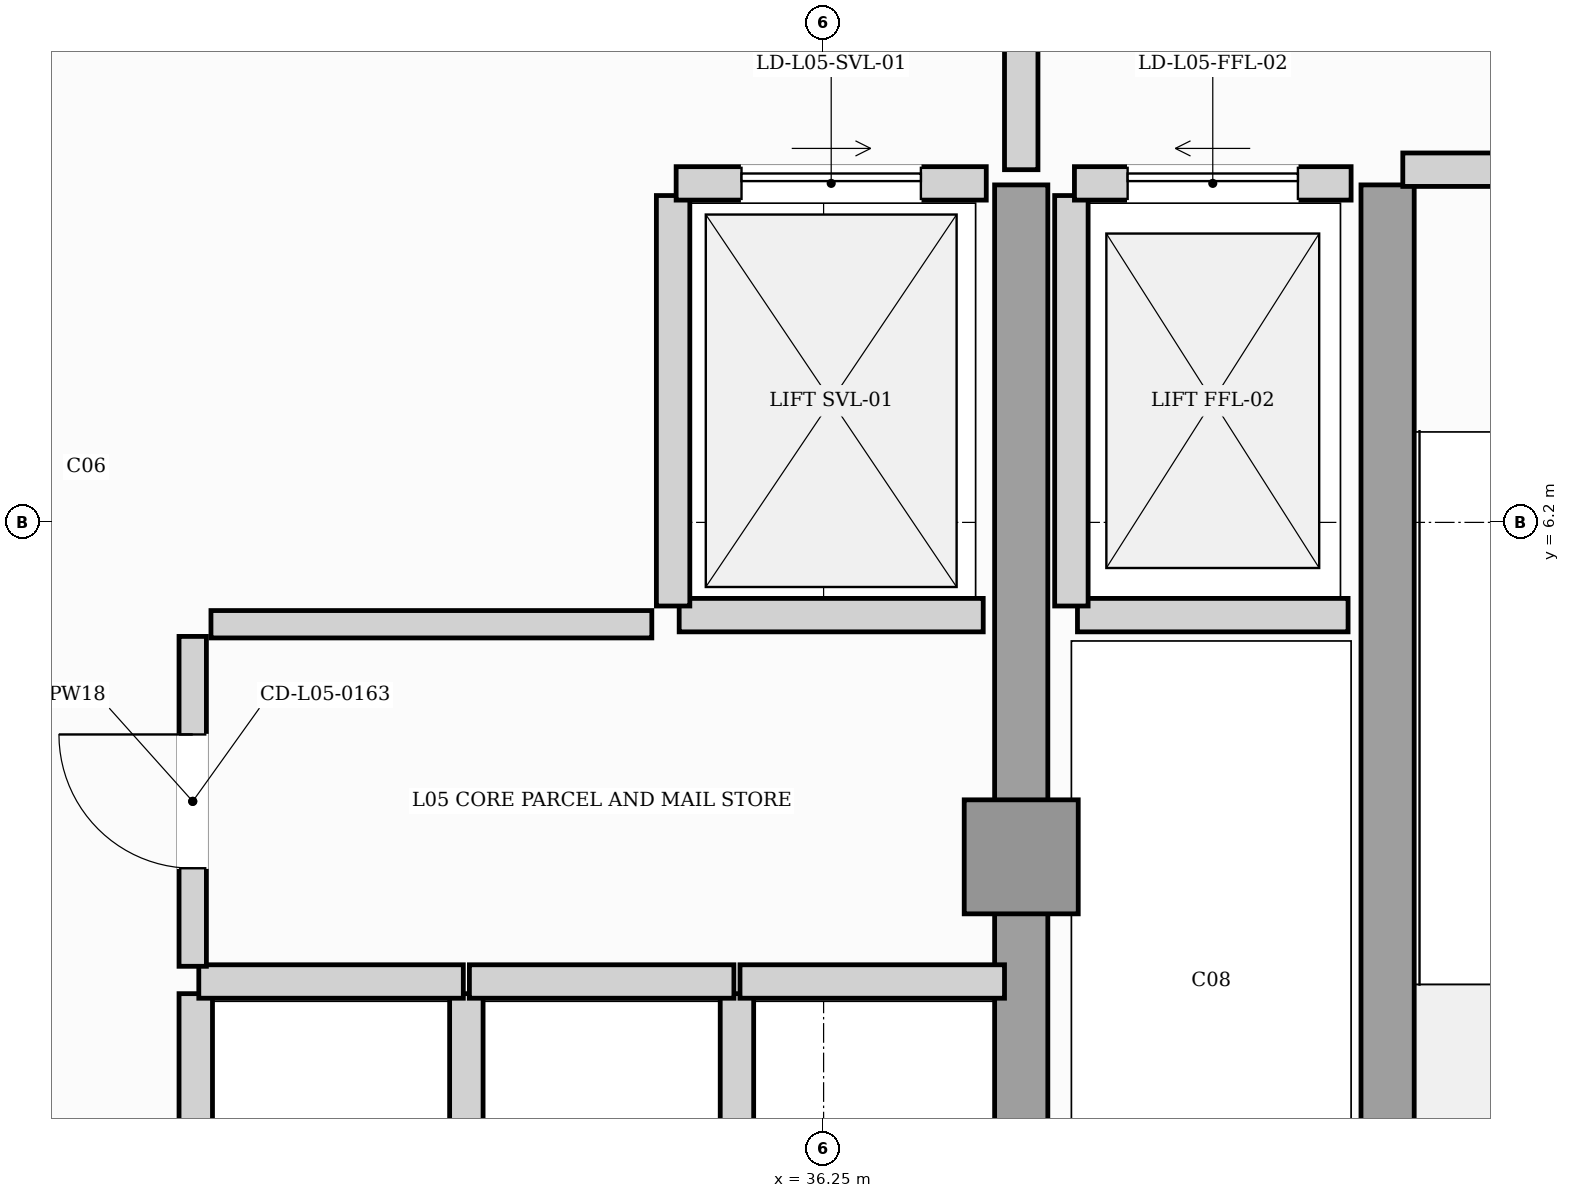
"""IFC4 building model, lengths in metres.
Left out: names, types, materials, properties, quantities, classifications, styles, units other than length and angle.
Written with IfcOpenShell. Run it as: python <this file> out.ifc"""

import sys

from ifc_helpers import new_model, si_unit, direction, frame, frame_2d, origin, origin_2d, place, context, subcontext, project, spatial, rectangle, extrude, element, fill, save


model = new_model("IFC4")
c1 = context("Model", 3, precision=1e-05, world=origin(), true_north=direction((0.0, 1.0)))
c2 = subcontext(c1, "Body", "Model", "MODEL_VIEW")
j1 = project(units=[si_unit("LENGTHUNIT", "METRE"), si_unit("PLANEANGLEUNIT", "RADIAN")], contexts=[c1])
p1 = place(None, origin())
s1 = spatial("IfcSite", under=j1, at=p1, CompositionType="ELEMENT")
p2 = place(p1, origin())
s2 = spatial("IfcBuilding", under=s1, at=p2, CompositionType="ELEMENT")
p3 = place(p2, frame((0.0, 0.0, 24.6)))
s3 = spatial("IfcBuildingStorey", under=s2, at=p3, CompositionType="ELEMENT", Elevation=24.6)
for number, where, z_axis, x_axis in (
    (1, (37.55, 0.92, 0.0), (0.0, 0.0, 1.0), (0.0, 1.0, 0.0)),
    (2, (39.96, 0.92, 0.0), (0.0, 0.0, 1.0), (0.0, 1.0, 0.0)),
):
    element("IfcWall", number, at=place(p3, frame(where, z_axis=z_axis, x_axis=x_axis)), inside=s3, PredefinedType="SHEAR", context=c2, shape_type="SweptSolid", body=[
        extrude(rectangle(XDim=7.5, YDim=0.35, at=frame_2d((3.75, 0.0))), origin(), (0.0, 0.0, 1.0), 4.95),
    ])
p4 = place(p3, frame((37.55, 4.0, 0.0), z_axis=(0.0, 0.0, 1.0), x_axis=(1.0, 0.0, 0.0)))
e3 = element("IfcColumn", 3, at=p4, inside=s3, PredefinedType="COLUMN", context=c2, shape_type="SweptSolid", body=[
    extrude(rectangle(XDim=0.75, YDim=0.75, at=origin_2d()), origin(), (0.0, 0.0, 1.0), 5.2),
])
p5 = place(p3, frame((37.92, 5.59, 0.0), z_axis=(0.0, 0.0, 1.0), x_axis=(1.0, 0.0, 0.0)))
e4 = element("IfcWall", 4, at=p5, inside=s3, PredefinedType="SOLIDWALL", context=c2, shape_type="SweptSolid", body=[
    extrude(rectangle(XDim=1.78, YDim=0.22, at=frame_2d((0.89, 0.0))), origin(), (0.0, 0.0, 1.0), 4.95),
])
p6 = place(p3, frame((37.88, 5.65, 0.0), z_axis=(0.0, 0.0, 1.0), x_axis=(0.0, 1.0, 0.0)))
e5 = element("IfcWall", 5, at=p6, inside=s3, PredefinedType="SOLIDWALL", context=c2, shape_type="SweptSolid", body=[
    extrude(rectangle(XDim=2.7, YDim=0.22, at=frame_2d((1.35, 0.0))), origin(), (0.0, 0.0, 1.0), 4.95),
])
p7 = place(p3, frame((37.9, 8.43, 0.0), z_axis=(0.0, 0.0, 1.0), x_axis=(1.0, 0.0, 0.0)))
e6 = element("IfcWall", 6, at=p7, inside=s3, PredefinedType="SOLIDWALL", context=c2, shape_type="SweptSolid", body=[
    extrude(rectangle(XDim=1.82, YDim=0.22, at=frame_2d((0.91, 0.0))), origin(), (0.0, 0.0, 1.0), 4.95),
])
p8 = place(p7, frame((0.35, 0.0, 0.0)))
e7 = element("IfcOpeningElement", 7, at=p8, cuts=e6, PredefinedType="OPENING", context=c2, shape_type="SweptSolid", body=[
    extrude(rectangle(XDim=1.12, YDim=2.25, at=frame_2d((0.56, 1.125))), frame((0.0, 0.12, 0.0), z_axis=(0.0, -1.0, 0.0), x_axis=(1.0, 0.0, 0.0)), (0.0, 0.0, 1.0), 0.24),
])
p9 = place(p3, frame((35.3, 5.59, 0.0), z_axis=(0.0, 0.0, 1.0), x_axis=(1.0, 0.0, 0.0)))
e8 = element("IfcWall", 8, at=p9, inside=s3, PredefinedType="SOLIDWALL", context=c2, shape_type="SweptSolid", body=[
    extrude(rectangle(XDim=2.0, YDim=0.22, at=frame_2d((1.0, 0.0))), origin(), (0.0, 0.0, 1.0), 4.95),
])
p10 = place(p3, frame((35.26, 5.65, 0.0), z_axis=(0.0, 0.0, 1.0), x_axis=(0.0, 1.0, 0.0)))
e9 = element("IfcWall", 9, at=p10, inside=s3, PredefinedType="SOLIDWALL", context=c2, shape_type="SweptSolid", body=[
    extrude(rectangle(XDim=2.7, YDim=0.22, at=frame_2d((1.35, 0.0))), origin(), (0.0, 0.0, 1.0), 4.95),
])
p11 = place(p3, frame((35.28, 8.43, 0.0), z_axis=(0.0, 0.0, 1.0), x_axis=(1.0, 0.0, 0.0)))
e10 = element("IfcWall", 10, at=p11, inside=s3, PredefinedType="SOLIDWALL", context=c2, shape_type="SweptSolid", body=[
    extrude(rectangle(XDim=2.04, YDim=0.22, at=frame_2d((1.02, 0.0))), origin(), (0.0, 0.0, 1.0), 4.95),
])
p12 = place(p11, frame((0.43, 0.0, 0.0)))
e11 = element("IfcOpeningElement", 11, at=p12, cuts=e10, PredefinedType="OPENING", context=c2, shape_type="SweptSolid", body=[
    extrude(rectangle(XDim=1.18, YDim=2.2, at=frame_2d((0.59, 1.1))), frame((0.0, 0.12, 0.0), z_axis=(0.0, -1.0, 0.0), x_axis=(1.0, 0.0, 0.0)), (0.0, 0.0, 1.0), 0.24),
])
for number, where, z_axis, x_axis in (
    (12, (32.12, 0.9, 0.0), (0.0, 0.0, 1.0), (0.0, 1.0, 0.0)),
    (13, (33.9, 0.9, 0.0), (0.0, 0.0, 1.0), (0.0, 1.0, 0.0)),
):
    element("IfcWall", number, at=place(p3, frame(where, z_axis=z_axis, x_axis=x_axis)), inside=s3, PredefinedType="SOLIDWALL", context=c2, shape_type="SweptSolid", body=[
        extrude(rectangle(XDim=2.2, YDim=0.22, at=frame_2d((1.1, 0.0))), origin(), (0.0, 0.0, 1.0), 4.95),
    ])
p13 = place(p3, frame((32.14, 3.18, 0.0), z_axis=(0.0, 0.0, 1.0), x_axis=(1.0, 0.0, 0.0)))
e14 = element("IfcWall", 14, at=p13, inside=s3, PredefinedType="SOLIDWALL", context=c2, shape_type="SweptSolid", body=[
    extrude(rectangle(XDim=1.74, YDim=0.22, at=frame_2d((0.87, 0.0))), origin(), (0.0, 0.0, 1.0), 4.95),
])
p14 = place(p3, frame((35.68, 0.9, 0.0), z_axis=(0.0, 0.0, 1.0), x_axis=(0.0, 1.0, 0.0)))
e15 = element("IfcWall", 15, at=p14, inside=s3, PredefinedType="SOLIDWALL", context=c2, shape_type="SweptSolid", body=[
    extrude(rectangle(XDim=2.2, YDim=0.22, at=frame_2d((1.1, 0.0))), origin(), (0.0, 0.0, 1.0), 4.95),
])
for number, where, z_axis, x_axis in (
    (16, (33.92, 3.18, 0.0), (0.0, 0.0, 1.0), (1.0, 0.0, 0.0)),
    (17, (35.7, 3.18, 0.0), (0.0, 0.0, 1.0), (1.0, 0.0, 0.0)),
):
    element("IfcWall", number, at=place(p3, frame(where, z_axis=z_axis, x_axis=x_axis)), inside=s3, PredefinedType="SOLIDWALL", context=c2, shape_type="SweptSolid", body=[
        extrude(rectangle(XDim=1.74, YDim=0.22, at=frame_2d((0.87, 0.0))), origin(), (0.0, 0.0, 1.0), 4.95),
    ])
p15 = place(p3, frame((40.06, 8.52, 0.0), z_axis=(0.0, 0.0, 1.0), x_axis=(1.0, 0.0, 0.0)))
e18 = element("IfcWall", 18, at=p15, inside=s3, PredefinedType="SOLIDWALL", context=c2, shape_type="SweptSolid", body=[
    extrude(rectangle(XDim=3.4, YDim=0.22, at=frame_2d((1.7, 0.0))), origin(), (0.0, 0.0, 1.0), 4.95),
])
p16 = place(p15, frame((1.125, 0.0, 0.0)))
e19 = element("IfcOpeningElement", 19, at=p16, cuts=e18, PredefinedType="OPENING", context=c2, shape_type="SweptSolid", body=[
    extrude(rectangle(XDim=1.15, YDim=2.2, at=frame_2d((0.575, 1.1))), frame((0.0, 0.12, 0.0), z_axis=(0.0, -1.0, 0.0), x_axis=(1.0, 0.0, 0.0)), (0.0, 0.0, 1.0), 0.24),
])
p17 = place(p3, frame((37.55, 8.52, 0.0), z_axis=(0.0, 0.0, 1.0), x_axis=(0.0, 1.0, 0.0)))
e20 = element("IfcWall", 20, at=p17, inside=s3, PredefinedType="SOLIDWALL", context=c2, shape_type="SweptSolid", body=[
    extrude(rectangle(XDim=2.8, YDim=0.22, at=frame_2d((1.4, 0.0))), origin(), (0.0, 0.0, 1.0), 4.406),
])
p18 = place(p17, frame((0.85, 0.0, 0.0)))
e21 = element("IfcOpeningElement", 21, at=p18, cuts=e20, PredefinedType="OPENING", context=c2, shape_type="SweptSolid", body=[
    extrude(rectangle(XDim=1.1, YDim=2.2, at=frame_2d((0.55, 1.1))), frame((0.0, 0.12, 0.0), z_axis=(0.0, -1.0, 0.0), x_axis=(1.0, 0.0, 0.0)), (0.0, 0.0, 1.0), 0.24),
])
p19 = place(p3, frame((32.1, 3.28, 0.0), z_axis=(0.0, 0.0, 1.0), x_axis=(0.0, 1.0, 0.0)))
e22 = element("IfcWall", 22, at=p19, inside=s3, PredefinedType="PARTITIONING", context=c2, shape_type="SweptSolid", body=[
    extrude(rectangle(XDim=2.17, YDim=0.18, at=frame_2d((1.085, 0.0))), origin(), (0.0, 0.0, 1.0), 4.95),
])
p20 = place(p19, frame((0.645, 0.0, 0.0)))
e23 = element("IfcOpeningElement", 23, at=p20, cuts=e22, PredefinedType="OPENING", context=c2, shape_type="SweptSolid", body=[
    extrude(rectangle(XDim=0.88, YDim=2.05, at=frame_2d((0.44, 1.025))), frame((0.0, 0.1, 0.0), z_axis=(0.0, -1.0, 0.0), x_axis=(1.0, 0.0, 0.0)), (0.0, 0.0, 1.0), 0.2),
])
p21 = place(p3, frame((32.22, 5.53, 0.0), z_axis=(0.0, 0.0, 1.0), x_axis=(1.0, 0.0, 0.0)))
e24 = element("IfcWall", 24, at=p21, inside=s3, PredefinedType="PARTITIONING", context=c2, shape_type="SweptSolid", body=[
    extrude(rectangle(XDim=2.9, YDim=0.18, at=frame_2d((1.45, 0.0))), origin(), (0.0, 0.0, 1.0), 4.95),
])
p22 = place(p8, origin())
e25 = element("IfcDoor", 25, at=p22, inside=s3, OperationType="SLIDING_TO_LEFT", PredefinedType="DOOR", context=c2, shape_type="SweptSolid", body=[
    extrude(rectangle(XDim=1.12, YDim=2.25, at=frame_2d((0.56, 1.125))), frame((0.0, 0.025, 0.0), z_axis=(0.0, -1.0, 0.0), x_axis=(1.0, 0.0, 0.0)), (0.0, 0.0, 1.0), 0.05),
])
fill(e7, e25)
p23 = place(p12, origin())
e26 = element("IfcDoor", 26, at=p23, inside=s3, OperationType="SLIDING_TO_RIGHT", PredefinedType="DOOR", context=c2, shape_type="SweptSolid", body=[
    extrude(rectangle(XDim=1.18, YDim=2.2, at=frame_2d((0.59, 1.1))), frame((0.0, 0.025, 0.0), z_axis=(0.0, -1.0, 0.0), x_axis=(1.0, 0.0, 0.0)), (0.0, 0.0, 1.0), 0.05),
])
fill(e11, e26)
p24 = place(p20, origin())
e27 = element("IfcDoor", 27, at=p24, inside=s3, OperationType="SINGLE_SWING_RIGHT", PredefinedType="DOOR", context=c2, shape_type="SweptSolid", body=[
    extrude(rectangle(XDim=0.88, YDim=2.05, at=frame_2d((0.44, 1.025))), frame((0.0, 0.025, 0.0), z_axis=(0.0, -1.0, 0.0), x_axis=(1.0, 0.0, 0.0)), (0.0, 0.0, 1.0), 0.05),
])
fill(e23, e27)
save(model, sys.argv[1])
